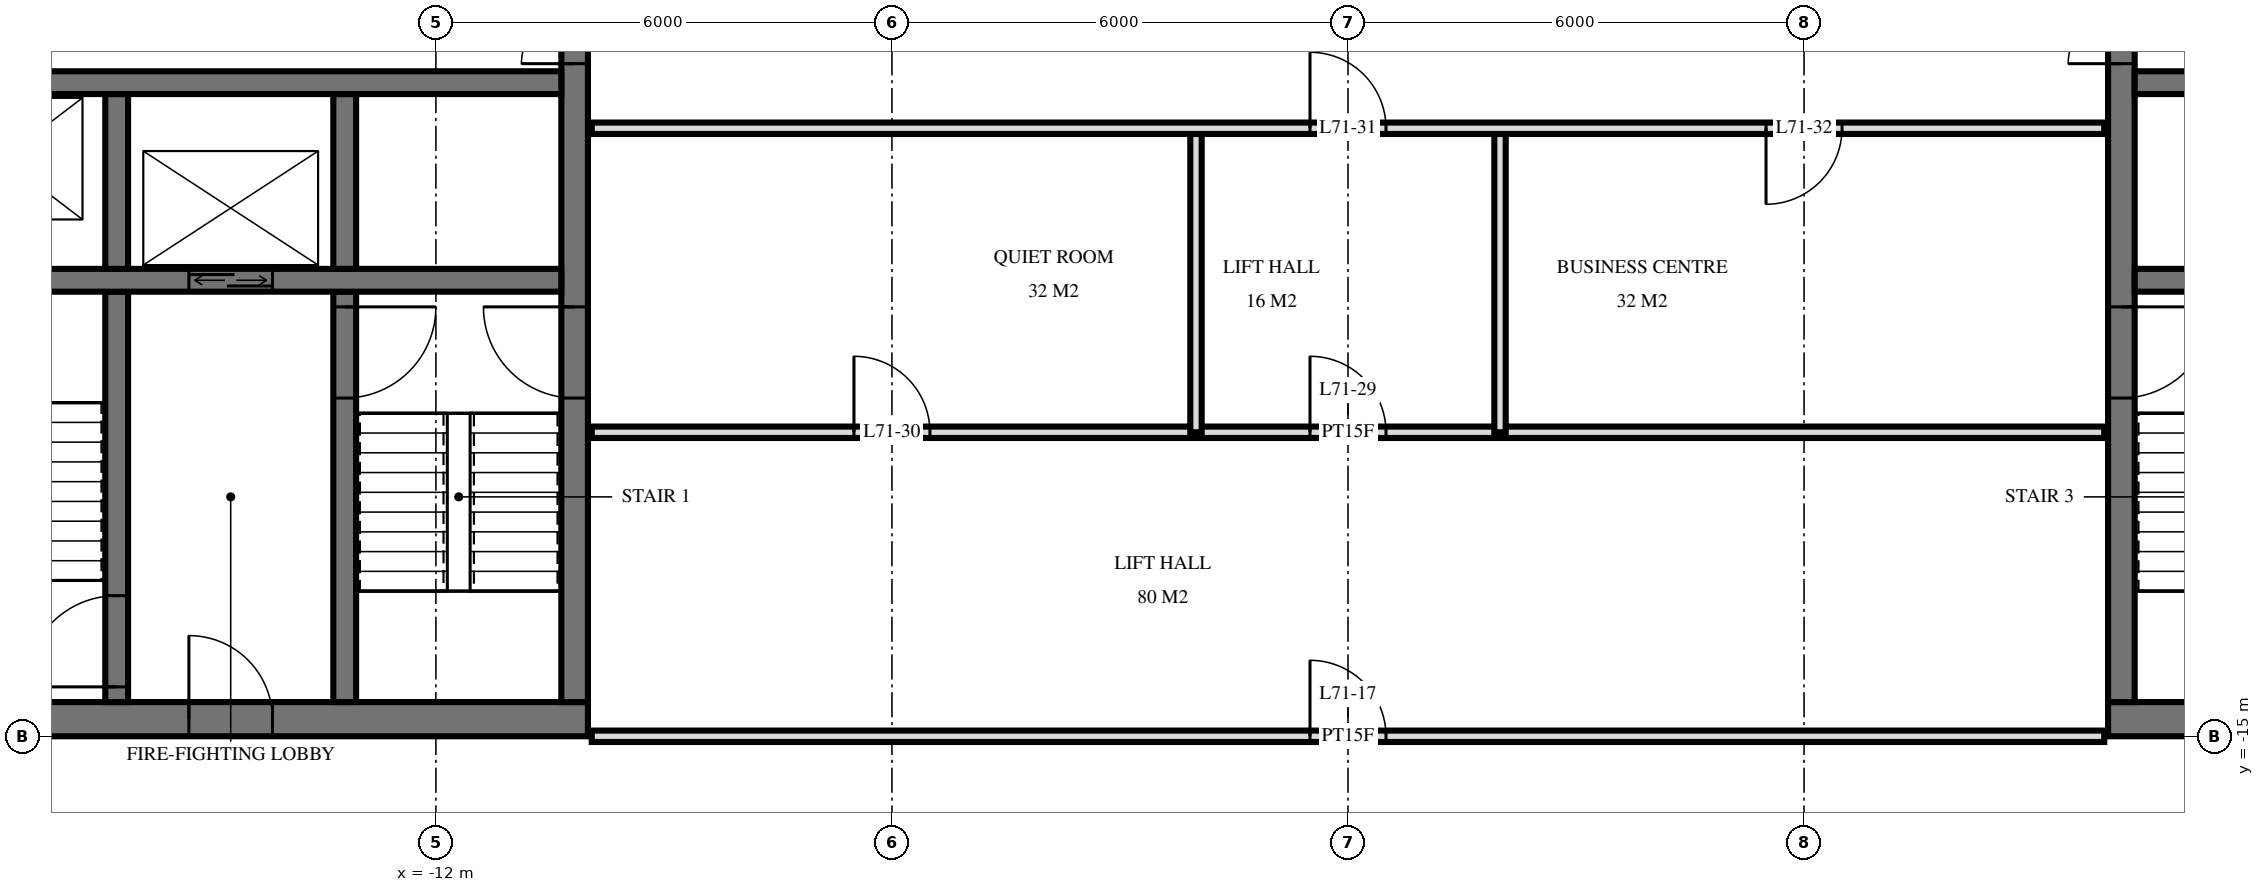
"""IFC4 building model, lengths in metres.
Left out: names, types, materials, properties, quantities, classifications, styles, units other than length and angle.
Written with IfcOpenShell. Run it as: python <this file> out.ifc"""

import sys

from ifc_helpers import new_model, si_unit, direction, frame, frame_2d, origin, place, context, subcontext, project, spatial, rectangle, extrude, element, fill, save


model = new_model("IFC4")
c1 = context("Model", 3, precision=1e-05, world=origin(), true_north=direction((0.0, 1.0)))
c2 = subcontext(c1, "Body", "Model", "MODEL_VIEW")
j1 = project(units=[si_unit("LENGTHUNIT", "METRE"), si_unit("PLANEANGLEUNIT", "RADIAN")], contexts=[c1])
p1 = place(None, origin())
s1 = spatial("IfcSite", under=j1, at=p1, CompositionType="ELEMENT")
p2 = place(p1, origin())
s2 = spatial("IfcBuilding", under=s1, at=p2, CompositionType="ELEMENT")
p3 = place(p2, frame((0.0, 0.0, 270.1)))
s3 = spatial("IfcBuildingStorey", under=s2, at=p3, CompositionType="ELEMENT", Elevation=270.1)
p4 = place(p3, frame((-19.5, -14.775, 0.0), z_axis=(0.0, 0.0, 1.0), x_axis=(1.0, 0.0, 0.0)))
e1 = element("IfcWall", 1, at=p4, inside=s3, PredefinedType="SHEAR", context=c2, shape_type="SweptSolid", body=[
    extrude(rectangle(XDim=9.5, YDim=0.45, at=frame_2d((4.75, 0.0))), origin(), (0.0, 0.0, 1.0), 3.5),
])
p5 = place(p4, frame((1.2, 0.0, 0.0)))
e2 = element("IfcOpeningElement", 2, at=p5, cuts=e1, PredefinedType="OPENING", context=c2, shape_type="SweptSolid", body=[
    extrude(rectangle(XDim=1.2, YDim=2.1, at=frame_2d((0.6, 1.05))), frame((0.0, 0.235, 0.0), z_axis=(0.0, -1.0, 0.0), x_axis=(1.0, 0.0, 0.0)), (0.0, 0.0, 1.0), 0.47),
])
p6 = place(p4, frame((4.25, 0.0, 0.0)))
e3 = element("IfcOpeningElement", 3, at=p6, cuts=e1, PredefinedType="OPENING", context=c2, shape_type="SweptSolid", body=[
    extrude(rectangle(XDim=1.1, YDim=2.1, at=frame_2d((0.55, 1.05))), frame((0.0, 0.235, 0.0), z_axis=(0.0, -1.0, 0.0), x_axis=(1.0, 0.0, 0.0)), (0.0, 0.0, 1.0), 0.47),
])
p7 = place(p3, frame((-10.175, -14.55, 0.0), z_axis=(0.0, 0.0, 1.0), x_axis=(0.0, 1.0, 0.0)))
e4 = element("IfcWall", 4, at=p7, inside=s3, PredefinedType="SHEAR", context=c2, shape_type="SweptSolid", body=[
    extrude(rectangle(XDim=14.1, YDim=0.35, at=frame_2d((7.05, 0.0))), origin(), (0.0, 0.0, 1.0), 3.5),
])
p8 = place(p7, frame((8.4, 0.0, 0.0)))
e5 = element("IfcOpeningElement", 5, at=p8, cuts=e4, PredefinedType="OPENING", context=c2, shape_type="SweptSolid", body=[
    extrude(rectangle(XDim=1.4, YDim=2.4, at=frame_2d((0.7, 1.2))), frame((0.0, 0.185, 0.0), z_axis=(0.0, -1.0, 0.0), x_axis=(1.0, 0.0, 0.0)), (0.0, 0.0, 1.0), 0.37),
])
p9 = place(p7, frame((10.0, 0.0, 0.0)))
e6 = element("IfcOpeningElement", 6, at=p9, cuts=e4, PredefinedType="OPENING", context=c2, shape_type="SweptSolid", body=[
    extrude(rectangle(XDim=1.4, YDim=2.4, at=frame_2d((0.7, 1.2))), frame((0.0, 0.185, 0.0), z_axis=(0.0, -1.0, 0.0), x_axis=(1.0, 0.0, 0.0)), (0.0, 0.0, 1.0), 0.37),
])
p10 = place(p7, frame((4.0, 0.0, 0.0)))
e7 = element("IfcOpeningElement", 7, at=p10, cuts=e4, PredefinedType="OPENING", context=c2, shape_type="SweptSolid", body=[
    extrude(rectangle(XDim=1.2, YDim=2.1, at=frame_2d((0.6, 1.05))), frame((0.0, 0.185, 0.0), z_axis=(0.0, -1.0, 0.0), x_axis=(1.0, 0.0, 0.0)), (0.0, 0.0, 1.0), 0.37),
])
p11 = place(p3, frame((-19.05, -6.4, 0.0), z_axis=(0.0, 0.0, 1.0), x_axis=(1.0, 0.0, 0.0)))
e8 = element("IfcWall", 8, at=p11, inside=s3, PredefinedType="SHEAR", context=c2, shape_type="SweptSolid", body=[
    extrude(rectangle(XDim=8.7, YDim=0.3, at=frame_2d((4.35, 0.0))), origin(), (0.0, 0.0, 1.0), 3.5),
])
p12 = place(p11, frame((0.8, 0.0, 0.0)))
e9 = element("IfcOpeningElement", 9, at=p12, cuts=e8, PredefinedType="OPENING", context=c2, shape_type="SweptSolid", body=[
    extrude(rectangle(XDim=1.1, YDim=2.1, at=frame_2d((0.55, 1.05))), frame((0.0, 0.16, 0.0), z_axis=(0.0, -1.0, 0.0), x_axis=(1.0, 0.0, 0.0)), (0.0, 0.0, 1.0), 0.32),
])
p13 = place(p3, frame((-19.05, -9.0, 0.0), z_axis=(0.0, 0.0, 1.0), x_axis=(1.0, 0.0, 0.0)))
e10 = element("IfcWall", 10, at=p13, inside=s3, PredefinedType="SHEAR", context=c2, shape_type="SweptSolid", body=[
    extrude(rectangle(XDim=8.7, YDim=0.3, at=frame_2d((4.35, 0.0))), origin(), (0.0, 0.0, 1.0), 3.5),
])
p14 = place(p13, frame((3.8, 0.0, 0.0)))
e11 = element("IfcOpeningElement", 11, at=p14, cuts=e10, PredefinedType="OPENING", context=c2, shape_type="SweptSolid", body=[
    extrude(rectangle(XDim=1.1, YDim=2.1, at=frame_2d((0.55, 1.05))), frame((0.0, 0.16, 0.0), z_axis=(0.0, -1.0, 0.0), x_axis=(1.0, 0.0, 0.0)), (0.0, 0.0, 1.0), 0.32),
])
p15 = place(p3, frame((-13.2, -8.85, 0.0), z_axis=(0.0, 0.0, 1.0), x_axis=(0.0, 1.0, 0.0)))
e12 = element("IfcWall", 12, at=p15, inside=s3, PredefinedType="SHEAR", context=c2, shape_type="SweptSolid", body=[
    extrude(rectangle(XDim=2.3, YDim=0.3, at=frame_2d((1.15, 0.0))), origin(), (0.0, 0.0, 1.0), 3.5),
])
p16 = place(p3, frame((-13.2, -14.55, 0.0), z_axis=(0.0, 0.0, 1.0), x_axis=(0.0, 1.0, 0.0)))
e13 = element("IfcWall", 13, at=p16, inside=s3, PredefinedType="SHEAR", context=c2, shape_type="SweptSolid", body=[
    extrude(rectangle(XDim=5.4, YDim=0.3, at=frame_2d((2.7, 0.0))), origin(), (0.0, 0.0, 1.0), 3.5),
])
p17 = place(p16, frame((4.0, 0.0, 0.0)))
e14 = element("IfcOpeningElement", 14, at=p17, cuts=e13, PredefinedType="OPENING", context=c2, shape_type="SweptSolid", body=[
    extrude(rectangle(XDim=1.2, YDim=2.1, at=frame_2d((0.6, 1.05))), frame((0.0, 0.16, 0.0), z_axis=(0.0, -1.0, 0.0), x_axis=(1.0, 0.0, 0.0)), (0.0, 0.0, 1.0), 0.32),
])
p18 = place(p3, frame((-16.2, -8.85, 0.0), z_axis=(0.0, 0.0, 1.0), x_axis=(0.0, 1.0, 0.0)))
e15 = element("IfcWall", 15, at=p18, inside=s3, PredefinedType="SHEAR", context=c2, shape_type="SweptSolid", body=[
    extrude(rectangle(XDim=2.3, YDim=0.3, at=frame_2d((1.15, 0.0))), origin(), (0.0, 0.0, 1.0), 3.5),
])
p19 = place(p3, frame((-16.2, -14.55, 0.0), z_axis=(0.0, 0.0, 1.0), x_axis=(0.0, 1.0, 0.0)))
e16 = element("IfcWall", 16, at=p19, inside=s3, PredefinedType="SHEAR", context=c2, shape_type="SweptSolid", body=[
    extrude(rectangle(XDim=5.4, YDim=0.3, at=frame_2d((2.7, 0.0))), origin(), (0.0, 0.0, 1.0), 3.5),
])
p20 = place(p19, frame((0.2, 0.0, 0.0)))
e17 = element("IfcOpeningElement", 17, at=p20, cuts=e16, PredefinedType="OPENING", context=c2, shape_type="SweptSolid", body=[
    extrude(rectangle(XDim=1.2, YDim=2.1, at=frame_2d((0.6, 1.05))), frame((0.0, 0.16, 0.0), z_axis=(0.0, -1.0, 0.0), x_axis=(1.0, 0.0, 0.0)), (0.0, 0.0, 1.0), 0.32),
])
p21 = place(p3, frame((10.0, -14.775, 0.0), z_axis=(0.0, 0.0, 1.0), x_axis=(1.0, 0.0, 0.0)))
e18 = element("IfcWall", 18, at=p21, inside=s3, PredefinedType="SHEAR", context=c2, shape_type="SweptSolid", body=[
    extrude(rectangle(XDim=9.5, YDim=0.45, at=frame_2d((4.75, 0.0))), origin(), (0.0, 0.0, 1.0), 3.5),
])
p22 = place(p21, frame((7.1, 0.0, 0.0)))
e19 = element("IfcOpeningElement", 19, at=p22, cuts=e18, PredefinedType="OPENING", context=c2, shape_type="SweptSolid", body=[
    extrude(rectangle(XDim=1.2, YDim=2.1, at=frame_2d((0.6, 1.05))), frame((0.0, 0.235, 0.0), z_axis=(0.0, -1.0, 0.0), x_axis=(1.0, 0.0, 0.0)), (0.0, 0.0, 1.0), 0.47),
])
p23 = place(p21, frame((4.15, 0.0, 0.0)))
e20 = element("IfcOpeningElement", 20, at=p23, cuts=e18, PredefinedType="OPENING", context=c2, shape_type="SweptSolid", body=[
    extrude(rectangle(XDim=1.1, YDim=2.1, at=frame_2d((0.55, 1.05))), frame((0.0, 0.235, 0.0), z_axis=(0.0, -1.0, 0.0), x_axis=(1.0, 0.0, 0.0)), (0.0, 0.0, 1.0), 0.47),
])
p24 = place(p3, frame((10.175, -14.55, 0.0), z_axis=(0.0, 0.0, 1.0), x_axis=(0.0, 1.0, 0.0)))
e21 = element("IfcWall", 21, at=p24, inside=s3, PredefinedType="SHEAR", context=c2, shape_type="SweptSolid", body=[
    extrude(rectangle(XDim=14.1, YDim=0.35, at=frame_2d((7.05, 0.0))), origin(), (0.0, 0.0, 1.0), 3.5),
])
p25 = place(p24, frame((8.4, 0.0, 0.0)))
e22 = element("IfcOpeningElement", 22, at=p25, cuts=e21, PredefinedType="OPENING", context=c2, shape_type="SweptSolid", body=[
    extrude(rectangle(XDim=1.4, YDim=2.4, at=frame_2d((0.7, 1.2))), frame((0.0, 0.185, 0.0), z_axis=(0.0, -1.0, 0.0), x_axis=(1.0, 0.0, 0.0)), (0.0, 0.0, 1.0), 0.37),
])
p26 = place(p24, frame((10.0, 0.0, 0.0)))
e23 = element("IfcOpeningElement", 23, at=p26, cuts=e21, PredefinedType="OPENING", context=c2, shape_type="SweptSolid", body=[
    extrude(rectangle(XDim=1.4, YDim=2.4, at=frame_2d((0.7, 1.2))), frame((0.0, 0.185, 0.0), z_axis=(0.0, -1.0, 0.0), x_axis=(1.0, 0.0, 0.0)), (0.0, 0.0, 1.0), 0.37),
])
p27 = place(p24, frame((4.0, 0.0, 0.0)))
e24 = element("IfcOpeningElement", 24, at=p27, cuts=e21, PredefinedType="OPENING", context=c2, shape_type="SweptSolid", body=[
    extrude(rectangle(XDim=1.2, YDim=2.1, at=frame_2d((0.6, 1.05))), frame((0.0, 0.185, 0.0), z_axis=(0.0, -1.0, 0.0), x_axis=(1.0, 0.0, 0.0)), (0.0, 0.0, 1.0), 0.37),
])
p28 = place(p3, frame((10.35, -6.4, 0.0), z_axis=(0.0, 0.0, 1.0), x_axis=(1.0, 0.0, 0.0)))
e25 = element("IfcWall", 25, at=p28, inside=s3, PredefinedType="SHEAR", context=c2, shape_type="SweptSolid", body=[
    extrude(rectangle(XDim=8.7, YDim=0.3, at=frame_2d((4.35, 0.0))), origin(), (0.0, 0.0, 1.0), 3.5),
])
p29 = place(p28, frame((6.8, 0.0, 0.0)))
e26 = element("IfcOpeningElement", 26, at=p29, cuts=e25, PredefinedType="OPENING", context=c2, shape_type="SweptSolid", body=[
    extrude(rectangle(XDim=1.1, YDim=2.1, at=frame_2d((0.55, 1.05))), frame((0.0, 0.16, 0.0), z_axis=(0.0, -1.0, 0.0), x_axis=(1.0, 0.0, 0.0)), (0.0, 0.0, 1.0), 0.32),
])
p30 = place(p3, frame((10.35, -9.0, 0.0), z_axis=(0.0, 0.0, 1.0), x_axis=(1.0, 0.0, 0.0)))
e27 = element("IfcWall", 27, at=p30, inside=s3, PredefinedType="SHEAR", context=c2, shape_type="SweptSolid", body=[
    extrude(rectangle(XDim=8.7, YDim=0.3, at=frame_2d((4.35, 0.0))), origin(), (0.0, 0.0, 1.0), 3.5),
])
p31 = place(p30, frame((3.8, 0.0, 0.0)))
e28 = element("IfcOpeningElement", 28, at=p31, cuts=e27, PredefinedType="OPENING", context=c2, shape_type="SweptSolid", body=[
    extrude(rectangle(XDim=1.1, YDim=2.1, at=frame_2d((0.55, 1.05))), frame((0.0, 0.16, 0.0), z_axis=(0.0, -1.0, 0.0), x_axis=(1.0, 0.0, 0.0)), (0.0, 0.0, 1.0), 0.32),
])
for number, where, z_axis, x_axis in (
    (29, (2.0, -11.0, 0.0), (0.0, 0.0, 1.0), (0.0, 1.0, 0.0)),
    (30, (-2.0, -11.0, 0.0), (0.0, 0.0, 1.0), (0.0, 1.0, 0.0)),
):
    element("IfcWall", number, at=place(p3, frame(where, z_axis=z_axis, x_axis=x_axis)), inside=s3, PredefinedType="PARTITIONING", context=c2, shape_type="SweptSolid", body=[
        extrude(rectangle(XDim=4.0, YDim=0.15, at=frame_2d((2.0, 0.0))), origin(), (0.0, 0.0, 1.0), 3.22),
    ])
p32 = place(p3, frame((-9.95, -15.0, 0.0), z_axis=(0.0, 0.0, 1.0), x_axis=(1.0, 0.0, 0.0)))
e31 = element("IfcWall", 31, at=p32, inside=s3, PredefinedType="PARTITIONING", context=c2, shape_type="SweptSolid", body=[
    extrude(rectangle(XDim=19.9, YDim=0.15, at=frame_2d((9.95, 0.0))), origin(), (0.0, 0.0, 1.0), 2.584),
])
p33 = place(p32, frame((9.45, 0.0, 0.0)))
e32 = element("IfcOpeningElement", 32, at=p33, cuts=e31, PredefinedType="OPENING", context=c2, shape_type="SweptSolid", body=[
    extrude(rectangle(XDim=1.0, YDim=2.1, at=frame_2d((0.5, 1.05))), frame((0.0, 0.085, 0.0), z_axis=(0.0, -1.0, 0.0), x_axis=(1.0, 0.0, 0.0)), (0.0, 0.0, 1.0), 0.17),
])
p34 = place(p3, frame((-9.95, -11.0, 0.0), z_axis=(0.0, 0.0, 1.0), x_axis=(1.0, 0.0, 0.0)))
e33 = element("IfcWall", 33, at=p34, inside=s3, PredefinedType="PARTITIONING", context=c2, shape_type="SweptSolid", body=[
    extrude(rectangle(XDim=19.9, YDim=0.15, at=frame_2d((9.95, 0.0))), origin(), (0.0, 0.0, 1.0), 3.22),
])
p35 = place(p34, frame((9.45, 0.0, 0.0)))
e34 = element("IfcOpeningElement", 34, at=p35, cuts=e33, PredefinedType="OPENING", context=c2, shape_type="SweptSolid", body=[
    extrude(rectangle(XDim=1.0, YDim=2.1, at=frame_2d((0.5, 1.05))), frame((0.0, 0.085, 0.0), z_axis=(0.0, -1.0, 0.0), x_axis=(1.0, 0.0, 0.0)), (0.0, 0.0, 1.0), 0.17),
])
p36 = place(p34, frame((3.45, 0.0, 0.0)))
e35 = element("IfcOpeningElement", 35, at=p36, cuts=e33, PredefinedType="OPENING", context=c2, shape_type="SweptSolid", body=[
    extrude(rectangle(XDim=1.0, YDim=2.1, at=frame_2d((0.5, 1.05))), frame((0.0, 0.085, 0.0), z_axis=(0.0, -1.0, 0.0), x_axis=(1.0, 0.0, 0.0)), (0.0, 0.0, 1.0), 0.17),
])
p37 = place(p3, frame((-9.95, -7.0, 0.0), z_axis=(0.0, 0.0, 1.0), x_axis=(1.0, 0.0, 0.0)))
e36 = element("IfcWall", 36, at=p37, inside=s3, PredefinedType="PARTITIONING", context=c2, shape_type="SweptSolid", body=[
    extrude(rectangle(XDim=19.9, YDim=0.15, at=frame_2d((9.95, 0.0))), origin(), (0.0, 0.0, 1.0), 3.22),
])
p38 = place(p37, frame((9.45, 0.0, 0.0)))
e37 = element("IfcOpeningElement", 37, at=p38, cuts=e36, PredefinedType="OPENING", context=c2, shape_type="SweptSolid", body=[
    extrude(rectangle(XDim=1.0, YDim=2.1, at=frame_2d((0.5, 1.05))), frame((0.0, 0.085, 0.0), z_axis=(0.0, -1.0, 0.0), x_axis=(1.0, 0.0, 0.0)), (0.0, 0.0, 1.0), 0.17),
])
p39 = place(p37, frame((15.45, 0.0, 0.0)))
e38 = element("IfcOpeningElement", 38, at=p39, cuts=e36, PredefinedType="OPENING", context=c2, shape_type="SweptSolid", body=[
    extrude(rectangle(XDim=1.0, YDim=2.1, at=frame_2d((0.5, 1.05))), frame((0.0, 0.085, 0.0), z_axis=(0.0, -1.0, 0.0), x_axis=(1.0, 0.0, 0.0)), (0.0, 0.0, 1.0), 0.17),
])
p40 = place(p14, origin())
e39 = element("IfcDoor", 39, at=p40, inside=s3, OperationType="DOUBLE_DOOR_SLIDING", PredefinedType="USERDEFINED", context=c2, shape_type="SweptSolid", body=[
    extrude(rectangle(XDim=1.1, YDim=2.1, at=frame_2d((0.55, 1.05))), frame((0.0, 0.025, 0.0), z_axis=(0.0, -1.0, 0.0), x_axis=(1.0, 0.0, 0.0)), (0.0, 0.0, 1.0), 0.05),
])
fill(e11, e39)
p41 = place(p8, origin())
e40 = element("IfcDoor", 40, at=p41, inside=s3, OperationType="DOUBLE_DOOR_SINGLE_SWING", PredefinedType="DOOR", context=c2, shape_type="SweptSolid", body=[
    extrude(rectangle(XDim=1.4, YDim=2.4, at=frame_2d((0.7, 1.2))), frame((0.0, 0.025, 0.0), z_axis=(0.0, -1.0, 0.0), x_axis=(1.0, 0.0, 0.0)), (0.0, 0.0, 1.0), 0.05),
])
fill(e5, e40)
p42 = place(p10, origin())
e41 = element("IfcDoor", 41, at=p42, inside=s3, OperationType="SINGLE_SWING_LEFT", PredefinedType="DOOR", context=c2, shape_type="SweptSolid", body=[
    extrude(rectangle(XDim=1.2, YDim=2.1, at=frame_2d((0.6, 1.05))), frame((0.0, 0.025, 0.0), z_axis=(0.0, -1.0, 0.0), x_axis=(1.0, 0.0, 0.0)), (0.0, 0.0, 1.0), 0.05),
])
fill(e7, e41)
p43 = place(p6, origin())
e42 = element("IfcDoor", 42, at=p43, inside=s3, OperationType="SINGLE_SWING_RIGHT", PredefinedType="DOOR", context=c2, shape_type="SweptSolid", body=[
    extrude(rectangle(XDim=1.1, YDim=2.1, at=frame_2d((0.55, 1.05))), frame((0.0, 0.025, 0.0), z_axis=(0.0, -1.0, 0.0), x_axis=(1.0, 0.0, 0.0)), (0.0, 0.0, 1.0), 0.05),
])
fill(e3, e42)
p44 = place(p17, frame((0.6, 0.0, 0.0), z_axis=(0.0, 0.0, 1.0), x_axis=(-1.0, 0.0, 0.0)))
e43 = element("IfcDoor", 43, at=p44, inside=s3, OperationType="SINGLE_SWING_RIGHT", PredefinedType="DOOR", context=c2, shape_type="SweptSolid", body=[
    extrude(rectangle(XDim=1.2, YDim=2.1, at=frame_2d((0.0, 1.05))), frame((0.0, -0.025, 0.0), z_axis=(0.0, 1.0, 0.0), x_axis=(-1.0, 0.0, 0.0)), (0.0, 0.0, 1.0), 0.05),
])
fill(e14, e43)
p45 = place(p20, origin())
e44 = element("IfcDoor", 44, at=p45, inside=s3, OperationType="SINGLE_SWING_RIGHT", PredefinedType="DOOR", context=c2, shape_type="SweptSolid", body=[
    extrude(rectangle(XDim=1.2, YDim=2.1, at=frame_2d((0.6, 1.05))), frame((0.0, 0.025, 0.0), z_axis=(0.0, -1.0, 0.0), x_axis=(1.0, 0.0, 0.0)), (0.0, 0.0, 1.0), 0.05),
])
fill(e17, e44)
p46 = place(p25, origin())
e45 = element("IfcDoor", 45, at=p46, inside=s3, OperationType="DOUBLE_DOOR_SINGLE_SWING", PredefinedType="DOOR", context=c2, shape_type="SweptSolid", body=[
    extrude(rectangle(XDim=1.4, YDim=2.4, at=frame_2d((0.7, 1.2))), frame((0.0, 0.025, 0.0), z_axis=(0.0, -1.0, 0.0), x_axis=(1.0, 0.0, 0.0)), (0.0, 0.0, 1.0), 0.05),
])
fill(e22, e45)
p47 = place(p27, frame((0.6, 0.0, 0.0), z_axis=(0.0, 0.0, 1.0), x_axis=(-1.0, 0.0, 0.0)))
e46 = element("IfcDoor", 46, at=p47, inside=s3, OperationType="SINGLE_SWING_RIGHT", PredefinedType="DOOR", context=c2, shape_type="SweptSolid", body=[
    extrude(rectangle(XDim=1.2, YDim=2.1, at=frame_2d((0.0, 1.05))), frame((0.0, -0.025, 0.0), z_axis=(0.0, 1.0, 0.0), x_axis=(-1.0, 0.0, 0.0)), (0.0, 0.0, 1.0), 0.05),
])
fill(e24, e46)
p48 = place(p33, origin())
e47 = element("IfcDoor", 47, at=p48, inside=s3, OperationType="SINGLE_SWING_RIGHT", PredefinedType="DOOR", context=c2, shape_type="SweptSolid", body=[
    extrude(rectangle(XDim=1.0, YDim=2.1, at=frame_2d((0.5, 1.05))), frame((0.0, 0.025, 0.0), z_axis=(0.0, -1.0, 0.0), x_axis=(1.0, 0.0, 0.0)), (0.0, 0.0, 1.0), 0.05),
])
fill(e32, e47)
p49 = place(p35, origin())
e48 = element("IfcDoor", 48, at=p49, inside=s3, OperationType="SINGLE_SWING_RIGHT", PredefinedType="DOOR", context=c2, shape_type="SweptSolid", body=[
    extrude(rectangle(XDim=1.0, YDim=2.1, at=frame_2d((0.5, 1.05))), frame((0.0, 0.025, 0.0), z_axis=(0.0, -1.0, 0.0), x_axis=(1.0, 0.0, 0.0)), (0.0, 0.0, 1.0), 0.05),
])
fill(e34, e48)
p50 = place(p36, origin())
e49 = element("IfcDoor", 49, at=p50, inside=s3, OperationType="SINGLE_SWING_RIGHT", PredefinedType="DOOR", context=c2, shape_type="SweptSolid", body=[
    extrude(rectangle(XDim=1.0, YDim=2.1, at=frame_2d((0.5, 1.05))), frame((0.0, 0.025, 0.0), z_axis=(0.0, -1.0, 0.0), x_axis=(1.0, 0.0, 0.0)), (0.0, 0.0, 1.0), 0.05),
])
fill(e35, e49)
p51 = place(p38, origin())
e50 = element("IfcDoor", 50, at=p51, inside=s3, OperationType="SINGLE_SWING_RIGHT", PredefinedType="DOOR", context=c2, shape_type="SweptSolid", body=[
    extrude(rectangle(XDim=1.0, YDim=2.1, at=frame_2d((0.5, 1.05))), frame((0.0, 0.025, 0.0), z_axis=(0.0, -1.0, 0.0), x_axis=(1.0, 0.0, 0.0)), (0.0, 0.0, 1.0), 0.05),
])
fill(e37, e50)
p52 = place(p39, frame((0.5, 0.0, 0.0), z_axis=(0.0, 0.0, 1.0), x_axis=(-1.0, 0.0, 0.0)))
e51 = element("IfcDoor", 51, at=p52, inside=s3, OperationType="SINGLE_SWING_LEFT", PredefinedType="DOOR", context=c2, shape_type="SweptSolid", body=[
    extrude(rectangle(XDim=1.0, YDim=2.1, at=frame_2d((0.0, 1.05))), frame((0.0, -0.025, 0.0), z_axis=(0.0, 1.0, 0.0), x_axis=(-1.0, 0.0, 0.0)), (0.0, 0.0, 1.0), 0.05),
])
fill(e38, e51)
save(model, sys.argv[1])
